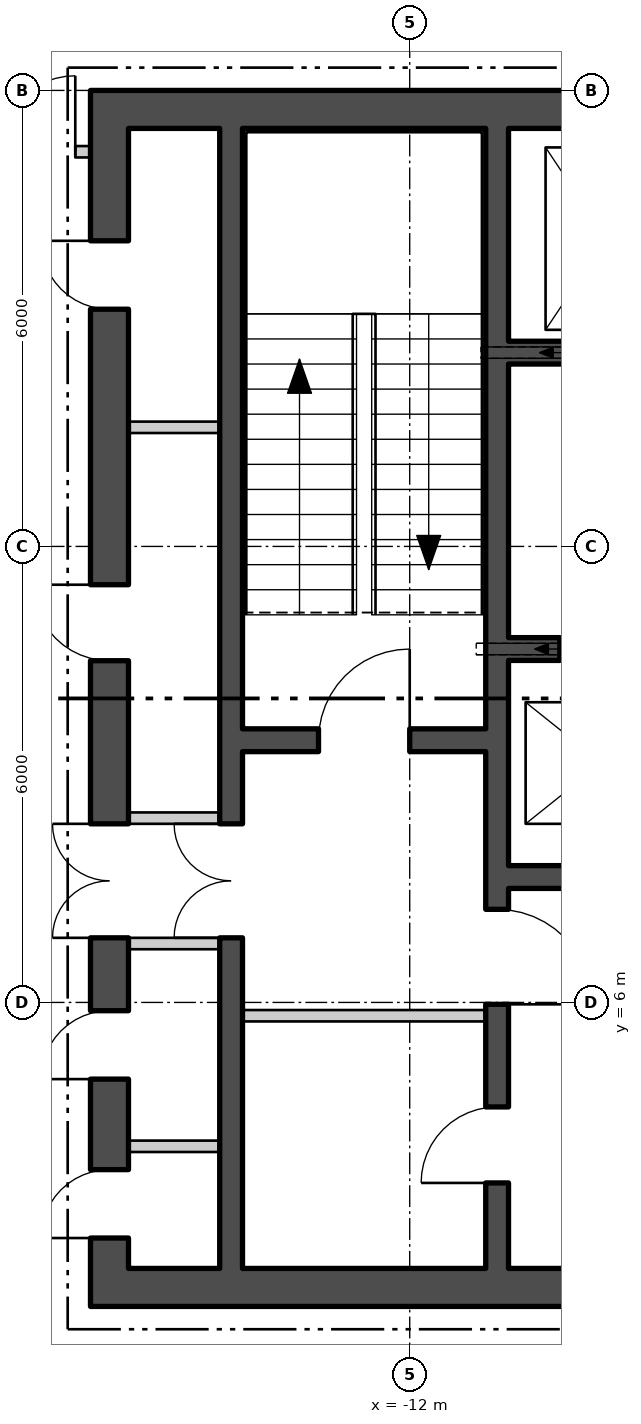
"""IFC4 building model, lengths in metres.
Left out: names, types, materials, properties, quantities, classifications, styles, units other than length and angle.
Written with IfcOpenShell. Run it as: python <this file> out.ifc"""

import sys

from ifc_helpers import new_model, si_unit, direction, frame, frame_2d, origin, place, context, subcontext, project, spatial, polyline, rectangle, outline, extrude, element, fill, save


model = new_model("IFC4")
c1 = context("Model", 3, precision=1e-05, world=origin(), true_north=direction((0.0, 1.0)))
c2 = subcontext(c1, "Body", "Model", "MODEL_VIEW")
j1 = project(units=[si_unit("LENGTHUNIT", "METRE"), si_unit("PLANEANGLEUNIT", "RADIAN")], contexts=[c1])
p1 = place(None, origin())
s1 = spatial("IfcSite", under=j1, at=p1, CompositionType="ELEMENT")
p2 = place(p1, origin())
s2 = spatial("IfcBuilding", under=s1, at=p2, CompositionType="ELEMENT")
p3 = place(p2, frame((0.0, 0.0, 163.2)))
s3 = spatial("IfcBuildingStorey", under=s2, at=p3, CompositionType="ELEMENT", Elevation=163.2)
p4 = place(p3, frame((-26.925, 12.951, -0.18), z_axis=(0.0, 0.0, 1.0), x_axis=(0.499999764979, -0.866025539474, 0.0)))
e1 = element("IfcWall", 1, at=p4, inside=s3, PredefinedType="SOLIDWALL", context=c2, shape_type="SweptSolid", body=[
    extrude(outline(polyline([(-0.13, -0.225), (45.87, -0.225), (45.61, 0.225), (0.13, 0.225), (-0.13, -0.225)])), origin(), (0.0, 0.0, 1.0), 3.68),
])
p5 = place(p4, frame((1.424, 0.0, 1.08)))
e2 = element("IfcOpeningElement", 2, at=p5, cuts=e1, PredefinedType="OPENING", context=c2, shape_type="SweptSolid", body=[
    extrude(rectangle(XDim=2.4, YDim=2.0, at=frame_2d((1.2, 1.0))), frame((0.0, 0.235, 0.0), z_axis=(0.0, -1.0, 0.0), x_axis=(1.0, 0.0, 0.0)), (0.0, 0.0, 1.0), 0.47),
])
p6 = place(p4, frame((5.893, 0.0, 1.08)))
e3 = element("IfcOpeningElement", 3, at=p6, cuts=e1, PredefinedType="OPENING", context=c2, shape_type="SweptSolid", body=[
    extrude(rectangle(XDim=2.4, YDim=2.0, at=frame_2d((1.2, 1.0))), frame((0.0, 0.235, 0.0), z_axis=(0.0, -1.0, 0.0), x_axis=(1.0, 0.0, 0.0)), (0.0, 0.0, 1.0), 0.47),
])
p7 = place(p4, frame((10.401, 0.0, 1.08)))
e4 = element("IfcOpeningElement", 4, at=p7, cuts=e1, PredefinedType="OPENING", context=c2, shape_type="SweptSolid", body=[
    extrude(rectangle(XDim=2.4, YDim=2.0, at=frame_2d((1.2, 1.0))), frame((0.0, 0.235, 0.0), z_axis=(0.0, -1.0, 0.0), x_axis=(1.0, 0.0, 0.0)), (0.0, 0.0, 1.0), 0.47),
])
p8 = place(p4, frame((14.909, 0.0, 1.08)))
e5 = element("IfcOpeningElement", 5, at=p8, cuts=e1, PredefinedType="OPENING", context=c2, shape_type="SweptSolid", body=[
    extrude(rectangle(XDim=2.4, YDim=2.0, at=frame_2d((1.2, 1.0))), frame((0.0, 0.235, 0.0), z_axis=(0.0, -1.0, 0.0), x_axis=(1.0, 0.0, 0.0)), (0.0, 0.0, 1.0), 0.47),
])
p9 = place(p4, frame((19.416, 0.0, 1.08)))
e6 = element("IfcOpeningElement", 6, at=p9, cuts=e1, PredefinedType="OPENING", context=c2, shape_type="SweptSolid", body=[
    extrude(rectangle(XDim=2.4, YDim=2.0, at=frame_2d((1.2, 1.0))), frame((0.0, 0.235, 0.0), z_axis=(0.0, -1.0, 0.0), x_axis=(1.0, 0.0, 0.0)), (0.0, 0.0, 1.0), 0.47),
])
p10 = place(p4, frame((23.924, 0.0, 1.08)))
e7 = element("IfcOpeningElement", 7, at=p10, cuts=e1, PredefinedType="OPENING", context=c2, shape_type="SweptSolid", body=[
    extrude(rectangle(XDim=2.4, YDim=2.0, at=frame_2d((1.2, 1.0))), frame((0.0, 0.235, 0.0), z_axis=(0.0, -1.0, 0.0), x_axis=(1.0, 0.0, 0.0)), (0.0, 0.0, 1.0), 0.47),
])
p11 = place(p4, frame((28.431, 0.0, 1.08)))
e8 = element("IfcOpeningElement", 8, at=p11, cuts=e1, PredefinedType="OPENING", context=c2, shape_type="SweptSolid", body=[
    extrude(rectangle(XDim=2.4, YDim=2.0, at=frame_2d((1.2, 1.0))), frame((0.0, 0.235, 0.0), z_axis=(0.0, -1.0, 0.0), x_axis=(1.0, 0.0, 0.0)), (0.0, 0.0, 1.0), 0.47),
])
p12 = place(p4, frame((32.939, 0.0, 1.08)))
e9 = element("IfcOpeningElement", 9, at=p12, cuts=e1, PredefinedType="OPENING", context=c2, shape_type="SweptSolid", body=[
    extrude(rectangle(XDim=2.4, YDim=2.0, at=frame_2d((1.2, 1.0))), frame((0.0, 0.235, 0.0), z_axis=(0.0, -1.0, 0.0), x_axis=(1.0, 0.0, 0.0)), (0.0, 0.0, 1.0), 0.47),
])
p13 = place(p4, frame((37.447, 0.0, 1.08)))
e10 = element("IfcOpeningElement", 10, at=p13, cuts=e1, PredefinedType="OPENING", context=c2, shape_type="SweptSolid", body=[
    extrude(rectangle(XDim=2.4, YDim=2.0, at=frame_2d((1.2, 1.0))), frame((0.0, 0.235, 0.0), z_axis=(0.0, -1.0, 0.0), x_axis=(1.0, 0.0, 0.0)), (0.0, 0.0, 1.0), 0.47),
])
p14 = place(p4, frame((41.916, 0.0, 1.08)))
e11 = element("IfcOpeningElement", 11, at=p14, cuts=e1, PredefinedType="OPENING", context=c2, shape_type="SweptSolid", body=[
    extrude(rectangle(XDim=2.4, YDim=2.0, at=frame_2d((1.2, 1.0))), frame((0.0, 0.235, 0.0), z_axis=(0.0, -1.0, 0.0), x_axis=(1.0, 0.0, 0.0)), (0.0, 0.0, 1.0), 0.47),
])
p15 = place(p3, frame((-16.2, 2.25, 0.0), z_axis=(0.0, 0.0, 1.0), x_axis=(1.0, 0.0, 0.0)))
e12 = element("IfcWall", 12, at=p15, inside=s3, PredefinedType="SHEAR", context=c2, shape_type="SweptSolid", body=[
    extrude(rectangle(XDim=32.4, YDim=0.5, at=frame_2d((16.2, 0.0))), origin(), (0.0, 0.0, 1.0), 3.7),
])
p16 = place(p15, frame((10.7, 0.0, 0.0)))
e13 = element("IfcOpeningElement", 13, at=p16, cuts=e12, PredefinedType="OPENING", context=c2, shape_type="SweptSolid", body=[
    extrude(rectangle(XDim=1.8, YDim=2.4, at=frame_2d((0.9, 1.2))), frame((0.0, 0.26, 0.0), z_axis=(0.0, -1.0, 0.0), x_axis=(1.0, 0.0, 0.0)), (0.0, 0.0, 1.0), 0.52),
])
p17 = place(p15, frame((20.7, 0.0, 0.0)))
e14 = element("IfcOpeningElement", 14, at=p17, cuts=e12, PredefinedType="OPENING", context=c2, shape_type="SweptSolid", body=[
    extrude(rectangle(XDim=1.8, YDim=2.4, at=frame_2d((0.9, 1.2))), frame((0.0, 0.26, 0.0), z_axis=(0.0, -1.0, 0.0), x_axis=(1.0, 0.0, 0.0)), (0.0, 0.0, 1.0), 0.52),
])
p18 = place(p3, frame((-16.2, 17.75, 0.0), z_axis=(0.0, 0.0, 1.0), x_axis=(1.0, 0.0, 0.0)))
e15 = element("IfcWall", 15, at=p18, inside=s3, PredefinedType="SHEAR", context=c2, shape_type="SweptSolid", body=[
    extrude(rectangle(XDim=32.4, YDim=0.5, at=frame_2d((16.2, 0.0))), origin(), (0.0, 0.0, 1.0), 3.7),
])
p19 = place(p3, frame((-15.95, 2.5, 0.0), z_axis=(0.0, 0.0, 1.0), x_axis=(0.0, 1.0, 0.0)))
e16 = element("IfcWall", 16, at=p19, inside=s3, PredefinedType="SHEAR", context=c2, shape_type="SweptSolid", body=[
    extrude(rectangle(XDim=15.0, YDim=0.5, at=frame_2d((7.5, 0.0))), origin(), (0.0, 0.0, 1.0), 3.7),
])
p20 = place(p19, frame((4.35, 0.0, 0.0)))
e17 = element("IfcOpeningElement", 17, at=p20, cuts=e16, PredefinedType="OPENING", context=c2, shape_type="SweptSolid", body=[
    extrude(rectangle(XDim=1.5, YDim=2.1, at=frame_2d((0.75, 1.05))), frame((0.0, 0.26, 0.0), z_axis=(0.0, -1.0, 0.0), x_axis=(1.0, 0.0, 0.0)), (0.0, 0.0, 1.0), 0.52),
])
p21 = place(p19, frame((0.4, 0.0, 0.0)))
e18 = element("IfcOpeningElement", 18, at=p21, cuts=e16, PredefinedType="OPENING", context=c2, shape_type="SweptSolid", body=[
    extrude(rectangle(XDim=0.9, YDim=2.1, at=frame_2d((0.45, 1.05))), frame((0.0, 0.26, 0.0), z_axis=(0.0, -1.0, 0.0), x_axis=(1.0, 0.0, 0.0)), (0.0, 0.0, 1.0), 0.52),
])
p22 = place(p19, frame((2.491, 0.0, 0.0)))
e19 = element("IfcOpeningElement", 19, at=p22, cuts=e16, PredefinedType="OPENING", context=c2, shape_type="SweptSolid", body=[
    extrude(rectangle(XDim=0.9, YDim=2.1, at=frame_2d((0.45, 1.05))), frame((0.0, 0.26, 0.0), z_axis=(0.0, -1.0, 0.0), x_axis=(1.0, 0.0, 0.0)), (0.0, 0.0, 1.0), 0.52),
])
p23 = place(p19, frame((7.996, 0.0, 0.0)))
e20 = element("IfcOpeningElement", 20, at=p23, cuts=e16, PredefinedType="OPENING", context=c2, shape_type="SweptSolid", body=[
    extrude(rectangle(XDim=1.0, YDim=2.1, at=frame_2d((0.5, 1.05))), frame((0.0, 0.26, 0.0), z_axis=(0.0, -1.0, 0.0), x_axis=(1.0, 0.0, 0.0)), (0.0, 0.0, 1.0), 0.52),
])
p24 = place(p19, frame((12.621, 0.0, 0.0)))
e21 = element("IfcOpeningElement", 21, at=p24, cuts=e16, PredefinedType="OPENING", context=c2, shape_type="SweptSolid", body=[
    extrude(rectangle(XDim=0.9, YDim=2.1, at=frame_2d((0.45, 1.05))), frame((0.0, 0.26, 0.0), z_axis=(0.0, -1.0, 0.0), x_axis=(1.0, 0.0, 0.0)), (0.0, 0.0, 1.0), 0.52),
])
p25 = place(p3, frame((-10.85, 2.5, 0.0), z_axis=(0.0, 0.0, 1.0), x_axis=(0.0, 1.0, 0.0)))
e22 = element("IfcWall", 22, at=p25, inside=s3, PredefinedType="SHEAR", context=c2, shape_type="SweptSolid", body=[
    extrude(rectangle(XDim=15.0, YDim=0.3, at=frame_2d((7.5, 0.0))), origin(), (0.0, 0.0, 1.0), 3.7),
])
p26 = place(p25, frame((3.475, 0.0, 0.0)))
e23 = element("IfcOpeningElement", 23, at=p26, cuts=e22, PredefinedType="OPENING", context=c2, shape_type="SweptSolid", body=[
    extrude(rectangle(XDim=1.25, YDim=2.1, at=frame_2d((0.625, 1.05))), frame((0.0, 0.16, 0.0), z_axis=(0.0, -1.0, 0.0), x_axis=(1.0, 0.0, 0.0)), (0.0, 0.0, 1.0), 0.32),
])
p27 = place(p25, frame((1.125, 0.0, 0.0)))
e24 = element("IfcOpeningElement", 24, at=p27, cuts=e22, PredefinedType="OPENING", context=c2, shape_type="SweptSolid", body=[
    extrude(rectangle(XDim=1.0, YDim=2.1, at=frame_2d((0.5, 1.05))), frame((0.0, 0.16, 0.0), z_axis=(0.0, -1.0, 0.0), x_axis=(1.0, 0.0, 0.0)), (0.0, 0.0, 1.0), 0.32),
])
p28 = place(p3, frame((-14.35, 2.5, 0.0), z_axis=(0.0, 0.0, 1.0), x_axis=(0.0, 1.0, 0.0)))
e25 = element("IfcWall", 25, at=p28, inside=s3, PredefinedType="SHEAR", context=c2, shape_type="SweptSolid", body=[
    extrude(rectangle(XDim=15.0, YDim=0.3, at=frame_2d((7.5, 0.0))), origin(), (0.0, 0.0, 1.0), 3.7),
])
p29 = place(p28, frame((4.35, 0.0, 0.0)))
e26 = element("IfcOpeningElement", 26, at=p29, cuts=e25, PredefinedType="OPENING", context=c2, shape_type="SweptSolid", body=[
    extrude(rectangle(XDim=1.5, YDim=2.1, at=frame_2d((0.75, 1.05))), frame((0.0, 0.16, 0.0), z_axis=(0.0, -1.0, 0.0), x_axis=(1.0, 0.0, 0.0)), (0.0, 0.0, 1.0), 0.32),
])
p30 = place(p3, frame((-14.2, 9.45, 0.0), z_axis=(0.0, 0.0, 1.0), x_axis=(1.0, 0.0, 0.0)))
e27 = element("IfcWall", 27, at=p30, inside=s3, PredefinedType="SHEAR", context=c2, shape_type="SweptSolid", body=[
    extrude(rectangle(XDim=3.2, YDim=0.3, at=frame_2d((1.6, 0.0))), origin(), (0.0, 0.0, 1.0), 3.7),
])
p31 = place(p30, frame((1.0, 0.0, 0.0)))
e28 = element("IfcOpeningElement", 28, at=p31, cuts=e27, PredefinedType="OPENING", context=c2, shape_type="SweptSolid", body=[
    extrude(rectangle(XDim=1.2, YDim=2.1, at=frame_2d((0.6, 1.05))), frame((0.0, 0.16, 0.0), z_axis=(0.0, -1.0, 0.0), x_axis=(1.0, 0.0, 0.0)), (0.0, 0.0, 1.0), 0.32),
])
p32 = place(p3, frame((-10.7, 14.55, 0.0), z_axis=(0.0, 0.0, 1.0), x_axis=(1.0, 0.0, 0.0)))
e29 = element("IfcWall", 29, at=p32, inside=s3, PredefinedType="SHEAR", context=c2, shape_type="SweptSolid", body=[
    extrude(rectangle(XDim=21.4, YDim=0.3, at=frame_2d((10.7, 0.0))), origin(), (0.0, 0.0, 1.0), 3.7),
])
p33 = place(p32, frame((0.738, 0.0, 0.0)))
e30 = element("IfcOpeningElement", 30, at=p33, cuts=e29, PredefinedType="OPENING", context=c2, shape_type="SweptSolid", body=[
    extrude(rectangle(XDim=1.1, YDim=2.1, at=frame_2d((0.55, 1.05))), frame((0.0, 0.16, 0.0), z_axis=(0.0, -1.0, 0.0), x_axis=(1.0, 0.0, 0.0)), (0.0, 0.0, 1.0), 0.32),
])
p34 = place(p32, frame((3.462, 0.0, 0.0)))
e31 = element("IfcOpeningElement", 31, at=p34, cuts=e29, PredefinedType="OPENING", context=c2, shape_type="SweptSolid", body=[
    extrude(rectangle(XDim=1.1, YDim=2.1, at=frame_2d((0.55, 1.05))), frame((0.0, 0.16, 0.0), z_axis=(0.0, -1.0, 0.0), x_axis=(1.0, 0.0, 0.0)), (0.0, 0.0, 1.0), 0.32),
])
p35 = place(p32, frame((6.138, 0.0, 0.0)))
e32 = element("IfcOpeningElement", 32, at=p35, cuts=e29, PredefinedType="OPENING", context=c2, shape_type="SweptSolid", body=[
    extrude(rectangle(XDim=1.1, YDim=2.1, at=frame_2d((0.55, 1.05))), frame((0.0, 0.16, 0.0), z_axis=(0.0, -1.0, 0.0), x_axis=(1.0, 0.0, 0.0)), (0.0, 0.0, 1.0), 0.32),
])
p36 = place(p32, frame((8.812, 0.0, 0.0)))
e33 = element("IfcOpeningElement", 33, at=p36, cuts=e29, PredefinedType="OPENING", context=c2, shape_type="SweptSolid", body=[
    extrude(rectangle(XDim=1.1, YDim=2.1, at=frame_2d((0.55, 1.05))), frame((0.0, 0.16, 0.0), z_axis=(0.0, -1.0, 0.0), x_axis=(1.0, 0.0, 0.0)), (0.0, 0.0, 1.0), 0.32),
])
p37 = place(p32, frame((19.562, 0.0, 0.0)))
e34 = element("IfcOpeningElement", 34, at=p37, cuts=e29, PredefinedType="OPENING", context=c2, shape_type="SweptSolid", body=[
    extrude(rectangle(XDim=1.1, YDim=2.1, at=frame_2d((0.55, 1.05))), frame((0.0, 0.16, 0.0), z_axis=(0.0, -1.0, 0.0), x_axis=(1.0, 0.0, 0.0)), (0.0, 0.0, 1.0), 0.32),
])
p38 = place(p32, frame((12.875, 0.0, 0.0)))
e35 = element("IfcOpeningElement", 35, at=p38, cuts=e29, PredefinedType="OPENING", context=c2, shape_type="SweptSolid", body=[
    extrude(rectangle(XDim=1.0, YDim=2.1, at=frame_2d((0.5, 1.05))), frame((0.0, 0.16, 0.0), z_axis=(0.0, -1.0, 0.0), x_axis=(1.0, 0.0, 0.0)), (0.0, 0.0, 1.0), 0.32),
])
p39 = place(p32, frame((16.887, 0.0, 0.0)))
e36 = element("IfcOpeningElement", 36, at=p39, cuts=e29, PredefinedType="OPENING", context=c2, shape_type="SweptSolid", body=[
    extrude(rectangle(XDim=1.0, YDim=2.1, at=frame_2d((0.5, 1.05))), frame((0.0, 0.16, 0.0), z_axis=(0.0, -1.0, 0.0), x_axis=(1.0, 0.0, 0.0)), (0.0, 0.0, 1.0), 0.32),
])
p40 = place(p3, frame((-10.7, 10.65, 0.0), z_axis=(0.0, 0.0, 1.0), x_axis=(1.0, 0.0, 0.0)))
e37 = element("IfcWall", 37, at=p40, inside=s3, PredefinedType="SHEAR", context=c2, shape_type="SweptSolid", body=[
    extrude(rectangle(XDim=10.3, YDim=0.3, at=frame_2d((5.15, 0.0))), origin(), (0.0, 0.0, 1.0), 3.7),
])
p41 = place(p40, frame((0.675, 0.0, 0.0)))
e38 = element("IfcOpeningElement", 38, at=p41, cuts=e37, PredefinedType="OPENING", context=c2, shape_type="SweptSolid", body=[
    extrude(rectangle(XDim=1.1, YDim=2.1, at=frame_2d((0.55, 1.05))), frame((0.0, 0.16, 0.0), z_axis=(0.0, -1.0, 0.0), x_axis=(1.0, 0.0, 0.0)), (0.0, 0.0, 1.0), 0.32),
])
p42 = place(p40, frame((3.275, 0.0, 0.0)))
e39 = element("IfcOpeningElement", 39, at=p42, cuts=e37, PredefinedType="OPENING", context=c2, shape_type="SweptSolid", body=[
    extrude(rectangle(XDim=1.1, YDim=2.1, at=frame_2d((0.55, 1.05))), frame((0.0, 0.16, 0.0), z_axis=(0.0, -1.0, 0.0), x_axis=(1.0, 0.0, 0.0)), (0.0, 0.0, 1.0), 0.32),
])
p43 = place(p40, frame((5.825, 0.0, 0.0)))
e40 = element("IfcOpeningElement", 40, at=p43, cuts=e37, PredefinedType="OPENING", context=c2, shape_type="SweptSolid", body=[
    extrude(rectangle(XDim=1.1, YDim=2.1, at=frame_2d((0.55, 1.05))), frame((0.0, 0.16, 0.0), z_axis=(0.0, -1.0, 0.0), x_axis=(1.0, 0.0, 0.0)), (0.0, 0.0, 1.0), 0.32),
])
p44 = place(p40, frame((8.425, 0.0, 0.0)))
e41 = element("IfcOpeningElement", 41, at=p44, cuts=e37, PredefinedType="OPENING", context=c2, shape_type="SweptSolid", body=[
    extrude(rectangle(XDim=1.0, YDim=2.1, at=frame_2d((0.5, 1.05))), frame((0.0, 0.16, 0.0), z_axis=(0.0, -1.0, 0.0), x_axis=(1.0, 0.0, 0.0)), (0.0, 0.0, 1.0), 0.32),
])
p45 = place(p3, frame((-10.7, 7.65, 0.0), z_axis=(0.0, 0.0, 1.0), x_axis=(1.0, 0.0, 0.0)))
e42 = element("IfcWall", 42, at=p45, inside=s3, PredefinedType="SHEAR", context=c2, shape_type="SweptSolid", body=[
    extrude(rectangle(XDim=10.3, YDim=0.3, at=frame_2d((5.15, 0.0))), origin(), (0.0, 0.0, 1.0), 3.7),
])
p46 = place(p3, frame((-14.2, 5.825, 0.0), z_axis=(0.0, 0.0, 1.0), x_axis=(1.0, 0.0, 0.0)))
e43 = element("IfcWall", 43, at=p46, inside=s3, PredefinedType="PARTITIONING", context=c2, shape_type="SweptSolid", body=[
    extrude(rectangle(XDim=3.2, YDim=0.15, at=frame_2d((1.6, 0.0))), origin(), (0.0, 0.0, 1.0), 3.7),
])
for number, where, z_axis, x_axis in (
    (44, (-15.7, 6.775, 0.0), (0.0, 0.0, 1.0), (1.0, 0.0, 0.0)),
    (45, (-15.7, 8.425, 0.0), (0.0, 0.0, 1.0), (1.0, 0.0, 0.0)),
    (46, (-15.7, 4.107, 0.0), (0.0, 0.0, 1.0), (1.0, 0.0, 0.0)),
    (47, (-15.7, 13.567, 0.0), (0.0, 0.0, 1.0), (1.0, 0.0, 0.0)),
):
    element("IfcWall", number, at=place(p3, frame(where, z_axis=z_axis, x_axis=x_axis)), inside=s3, PredefinedType="PARTITIONING", context=c2, shape_type="SweptSolid", body=[
        extrude(rectangle(XDim=1.2, YDim=0.15, at=frame_2d((0.6, 0.0))), origin(), (0.0, 0.0, 1.0), 3.7),
    ])
p47 = place(p3, frame((-17.956, 17.193, 0.0), z_axis=(0.0, 0.0, 1.0), x_axis=(1.0, 0.0, 0.0)))
e48 = element("IfcWall", 48, at=p47, inside=s3, PredefinedType="PARTITIONING", context=c2, shape_type="SweptSolid", body=[
    extrude(rectangle(XDim=1.756, YDim=0.15, at=frame_2d((0.878, 0.0))), origin(), (0.0, 0.0, 1.0), 3.7),
])
p48 = place(p47, frame((0.556, 0.0, 0.0)))
e49 = element("IfcOpeningElement", 49, at=p48, cuts=e48, PredefinedType="OPENING", context=c2, shape_type="SweptSolid", body=[
    extrude(rectangle(XDim=1.0, YDim=2.1, at=frame_2d((0.5, 1.05))), frame((0.0, 0.085, 0.0), z_axis=(0.0, -1.0, 0.0), x_axis=(1.0, 0.0, 0.0)), (0.0, 0.0, 1.0), 0.17),
])
p49 = place(p41, origin())
e50 = element("IfcDoor", 50, at=p49, inside=s3, OperationType="SLIDING_TO_LEFT", PredefinedType="DOOR", context=c2, shape_type="SweptSolid", body=[
    extrude(rectangle(XDim=1.1, YDim=2.1, at=frame_2d((0.55, 1.05))), frame((0.0, 0.025, 0.0), z_axis=(0.0, -1.0, 0.0), x_axis=(1.0, 0.0, 0.0)), (0.0, 0.0, 1.0), 0.05),
])
fill(e38, e50)
p50 = place(p31, origin())
e51 = element("IfcDoor", 51, at=p50, inside=s3, OperationType="SINGLE_SWING_LEFT", PredefinedType="DOOR", context=c2, shape_type="SweptSolid", body=[
    extrude(rectangle(XDim=1.2, YDim=2.1, at=frame_2d((0.6, 1.05))), frame((0.0, 0.025, 0.0), z_axis=(0.0, -1.0, 0.0), x_axis=(1.0, 0.0, 0.0)), (0.0, 0.0, 1.0), 0.05),
])
fill(e28, e51)
p51 = place(p26, origin())
e52 = element("IfcDoor", 52, at=p51, inside=s3, OperationType="SINGLE_SWING_LEFT", PredefinedType="DOOR", context=c2, shape_type="SweptSolid", body=[
    extrude(rectangle(XDim=1.25, YDim=2.1, at=frame_2d((0.625, 1.05))), frame((0.0, 0.025, 0.0), z_axis=(0.0, -1.0, 0.0), x_axis=(1.0, 0.0, 0.0)), (0.0, 0.0, 1.0), 0.05),
])
fill(e23, e52)
p52 = place(p27, origin())
e53 = element("IfcDoor", 53, at=p52, inside=s3, OperationType="SINGLE_SWING_RIGHT", PredefinedType="DOOR", context=c2, shape_type="SweptSolid", body=[
    extrude(rectangle(XDim=1.0, YDim=2.1, at=frame_2d((0.5, 1.05))), frame((0.0, 0.025, 0.0), z_axis=(0.0, -1.0, 0.0), x_axis=(1.0, 0.0, 0.0)), (0.0, 0.0, 1.0), 0.05),
])
fill(e24, e53)
p53 = place(p29, origin())
e54 = element("IfcDoor", 54, at=p53, inside=s3, OperationType="DOUBLE_DOOR_SINGLE_SWING", PredefinedType="DOOR", context=c2, shape_type="SweptSolid", body=[
    extrude(rectangle(XDim=1.5, YDim=2.1, at=frame_2d((0.75, 1.05))), frame((0.0, 0.025, 0.0), z_axis=(0.0, -1.0, 0.0), x_axis=(1.0, 0.0, 0.0)), (0.0, 0.0, 1.0), 0.05),
])
fill(e26, e54)
p54 = place(p20, origin())
e55 = element("IfcDoor", 55, at=p54, inside=s3, OperationType="DOUBLE_DOOR_SINGLE_SWING", PredefinedType="DOOR", context=c2, shape_type="SweptSolid", body=[
    extrude(rectangle(XDim=1.5, YDim=2.1, at=frame_2d((0.75, 1.05))), frame((0.0, 0.025, 0.0), z_axis=(0.0, -1.0, 0.0), x_axis=(1.0, 0.0, 0.0)), (0.0, 0.0, 1.0), 0.05),
])
fill(e17, e55)
p55 = place(p21, origin())
e56 = element("IfcDoor", 56, at=p55, inside=s3, OperationType="SINGLE_SWING_RIGHT", PredefinedType="DOOR", context=c2, shape_type="SweptSolid", body=[
    extrude(rectangle(XDim=0.9, YDim=2.1, at=frame_2d((0.45, 1.05))), frame((0.0, 0.025, 0.0), z_axis=(0.0, -1.0, 0.0), x_axis=(1.0, 0.0, 0.0)), (0.0, 0.0, 1.0), 0.05),
])
fill(e18, e56)
p56 = place(p22, origin())
e57 = element("IfcDoor", 57, at=p56, inside=s3, OperationType="SINGLE_SWING_RIGHT", PredefinedType="DOOR", context=c2, shape_type="SweptSolid", body=[
    extrude(rectangle(XDim=0.9, YDim=2.1, at=frame_2d((0.45, 1.05))), frame((0.0, 0.025, 0.0), z_axis=(0.0, -1.0, 0.0), x_axis=(1.0, 0.0, 0.0)), (0.0, 0.0, 1.0), 0.05),
])
fill(e19, e57)
p57 = place(p23, origin())
e58 = element("IfcDoor", 58, at=p57, inside=s3, OperationType="SINGLE_SWING_LEFT", PredefinedType="DOOR", context=c2, shape_type="SweptSolid", body=[
    extrude(rectangle(XDim=1.0, YDim=2.1, at=frame_2d((0.5, 1.05))), frame((0.0, 0.025, 0.0), z_axis=(0.0, -1.0, 0.0), x_axis=(1.0, 0.0, 0.0)), (0.0, 0.0, 1.0), 0.05),
])
fill(e20, e58)
p58 = place(p24, origin())
e59 = element("IfcDoor", 59, at=p58, inside=s3, OperationType="SINGLE_SWING_LEFT", PredefinedType="DOOR", context=c2, shape_type="SweptSolid", body=[
    extrude(rectangle(XDim=0.9, YDim=2.1, at=frame_2d((0.45, 1.05))), frame((0.0, 0.025, 0.0), z_axis=(0.0, -1.0, 0.0), x_axis=(1.0, 0.0, 0.0)), (0.0, 0.0, 1.0), 0.05),
])
fill(e21, e59)
p59 = place(p48, origin())
e60 = element("IfcDoor", 60, at=p59, inside=s3, OperationType="SINGLE_SWING_LEFT", PredefinedType="DOOR", context=c2, shape_type="SweptSolid", body=[
    extrude(rectangle(XDim=1.0, YDim=2.1, at=frame_2d((0.5, 1.05))), frame((0.0, 0.025, 0.0), z_axis=(0.0, -1.0, 0.0), x_axis=(1.0, 0.0, 0.0)), (0.0, 0.0, 1.0), 0.05),
])
fill(e49, e60)
save(model, sys.argv[1])
